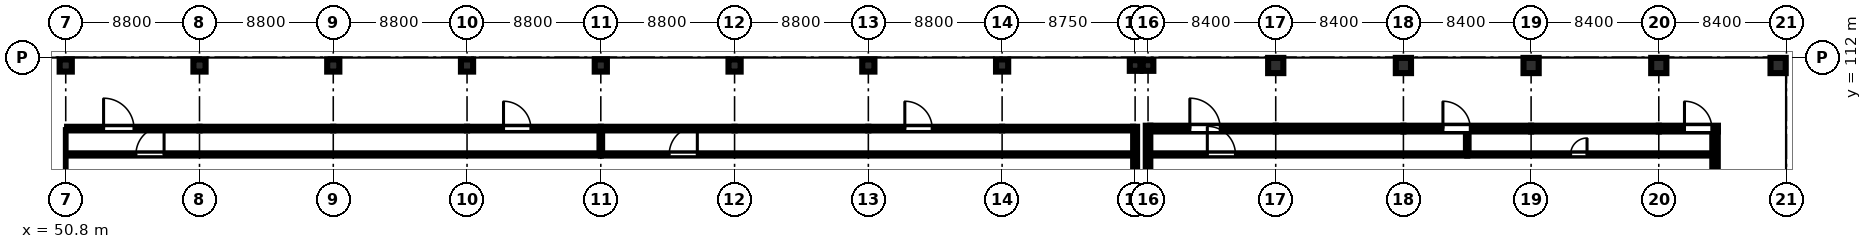
"""IFC4 building model, lengths in metres.
Left out: names, types, materials, properties, quantities, classifications, styles, units other than length and angle.
Written with IfcOpenShell. Run it as: python <this file> out.ifc"""

import sys

from ifc_helpers import new_model, si_unit, direction, frame, frame_2d, origin, origin_2d, place, context, subcontext, project, spatial, rectangle, circle, extrude, element, fill, save


model = new_model("IFC4")
c1 = context("Model", 3, precision=1e-05, world=origin(), true_north=direction((0.0, 1.0)))
c2 = subcontext(c1, "Body", "Model", "MODEL_VIEW")
j1 = project(units=[si_unit("LENGTHUNIT", "METRE"), si_unit("PLANEANGLEUNIT", "RADIAN")], contexts=[c1])
p1 = place(None, origin())
s1 = spatial("IfcSite", under=j1, at=p1, CompositionType="ELEMENT")
p2 = place(p1, origin())
s2 = spatial("IfcBuilding", under=s1, at=p2, CompositionType="ELEMENT")
p3 = place(p2, origin())
s3 = spatial("IfcBuildingStorey", under=s2, at=p3, CompositionType="ELEMENT", Elevation=0.0)
for number, where, z_axis, x_axis in (
    (1, (50.8, 111.45, 0.0), (0.0, 0.0, 1.0), (1.0, 0.0, 0.0)),
    (2, (59.6, 111.45, 0.0), (0.0, 0.0, 1.0), (1.0, 0.0, 0.0)),
    (3, (68.4, 111.45, 0.0), (0.0, 0.0, 1.0), (1.0, 0.0, 0.0)),
    (4, (77.2, 111.45, 0.0), (0.0, 0.0, 1.0), (1.0, 0.0, 0.0)),
    (5, (86.0, 111.45, 0.0), (0.0, 0.0, 1.0), (1.0, 0.0, 0.0)),
    (6, (94.8, 111.45, 0.0), (0.0, 0.0, 1.0), (1.0, 0.0, 0.0)),
    (7, (103.6, 111.45, 0.0), (0.0, 0.0, 1.0), (1.0, 0.0, 0.0)),
    (8, (112.4, 111.45, 0.0), (0.0, 0.0, 1.0), (1.0, 0.0, 0.0)),
):
    element("IfcColumn", number, at=place(p3, frame(where, z_axis=z_axis, x_axis=x_axis)), inside=s3, PredefinedType="COLUMN", context=c2, shape_type="SweptSolid", body=[
        extrude(circle(Radius=0.4, at=origin_2d()), origin(), (0.0, 0.0, 1.0), 5.18),
    ])
for number, where, z_axis, x_axis in (
    (9, (121.15, 111.45, 0.0), (0.0, 0.0, 1.0), (1.0, 0.0, 0.0)),
    (10, (122.0, 111.45, 0.0), (0.0, 0.0, 1.0), (1.0, 0.0, 0.0)),
):
    element("IfcColumn", number, at=place(p3, frame(where, z_axis=z_axis, x_axis=x_axis)), inside=s3, PredefinedType="COLUMN", context=c2, shape_type="SweptSolid", body=[
        extrude(rectangle(XDim=0.7, YDim=0.7, at=origin_2d()), origin(), (0.0, 0.0, 1.0), 5.18),
    ])
for number, where, z_axis, x_axis in (
    (11, (130.4, 111.45, 0.0), (0.0, 0.0, 1.0), (1.0, 0.0, 0.0)),
    (12, (138.8, 111.45, 0.0), (0.0, 0.0, 1.0), (1.0, 0.0, 0.0)),
    (13, (147.2, 111.45, 0.0), (0.0, 0.0, 1.0), (1.0, 0.0, 0.0)),
    (14, (155.6, 111.45, 0.0), (0.0, 0.0, 1.0), (1.0, 0.0, 0.0)),
    (15, (163.45, 111.45, 0.0), (0.0, 0.0, 1.0), (1.0, 0.0, 0.0)),
):
    element("IfcColumn", number, at=place(p3, frame(where, z_axis=z_axis, x_axis=x_axis)), inside=s3, PredefinedType="COLUMN", context=c2, shape_type="SweptSolid", body=[
        extrude(rectangle(XDim=1.0, YDim=1.0, at=origin_2d()), origin(), (0.0, 0.0, 1.0), 5.18),
    ])
p4 = place(p3, frame((50.89, 107.3, 0.0), z_axis=(0.0, 0.0, 1.0), x_axis=(1.0, 0.0, 0.0)))
e16 = element("IfcWall", 16, at=p4, inside=s3, PredefinedType="STANDARD", context=c2, shape_type="SweptSolid", body=[
    extrude(rectangle(XDim=8.71, YDim=0.24, at=frame_2d((4.355, 0.0))), origin(), (0.0, 0.0, 1.0), 5.18),
])
p5 = place(p4, frame((2.4, 0.0, 0.0)))
e17 = element("IfcOpeningElement", 17, at=p5, cuts=e16, PredefinedType="OPENING", context=c2, shape_type="SweptSolid", body=[
    extrude(rectangle(XDim=2.0, YDim=2.4, at=frame_2d((1.0, 1.2))), frame((0.0, 0.13, 0.0), z_axis=(0.0, -1.0, 0.0), x_axis=(1.0, 0.0, 0.0)), (0.0, 0.0, 1.0), 0.26),
])
p6 = place(p3, frame((59.6, 107.3, 0.0), z_axis=(0.0, 0.0, 1.0), x_axis=(1.0, 0.0, 0.0)))
e18 = element("IfcWall", 18, at=p6, inside=s3, PredefinedType="STANDARD", context=c2, shape_type="SweptSolid", body=[
    extrude(rectangle(XDim=8.8, YDim=0.24, at=frame_2d((4.4, 0.0))), origin(), (0.0, 0.0, 1.0), 5.18),
])
p7 = place(p6, frame((2.4, 0.0, 0.8)))
e19 = element("IfcOpeningElement", 19, at=p7, cuts=e18, PredefinedType="OPENING", context=c2, shape_type="SweptSolid", body=[
    extrude(rectangle(XDim=3.0, YDim=2.4, at=frame_2d((1.5, 1.2))), frame((0.0, 0.13, 0.0), z_axis=(0.0, -1.0, 0.0), x_axis=(1.0, 0.0, 0.0)), (0.0, 0.0, 1.0), 0.26),
])
p8 = place(p3, frame((68.4, 107.3, 0.0), z_axis=(0.0, 0.0, 1.0), x_axis=(1.0, 0.0, 0.0)))
e20 = element("IfcWall", 20, at=p8, inside=s3, PredefinedType="STANDARD", context=c2, shape_type="SweptSolid", body=[
    extrude(rectangle(XDim=8.8, YDim=0.24, at=frame_2d((4.4, 0.0))), origin(), (0.0, 0.0, 1.0), 5.18),
])
p9 = place(p8, frame((2.4, 0.0, 0.8)))
e21 = element("IfcOpeningElement", 21, at=p9, cuts=e20, PredefinedType="OPENING", context=c2, shape_type="SweptSolid", body=[
    extrude(rectangle(XDim=3.0, YDim=2.4, at=frame_2d((1.5, 1.2))), frame((0.0, 0.13, 0.0), z_axis=(0.0, -1.0, 0.0), x_axis=(1.0, 0.0, 0.0)), (0.0, 0.0, 1.0), 0.26),
])
p10 = place(p3, frame((77.2, 107.3, 0.0), z_axis=(0.0, 0.0, 1.0), x_axis=(1.0, 0.0, 0.0)))
e22 = element("IfcWall", 22, at=p10, inside=s3, PredefinedType="STANDARD", context=c2, shape_type="SweptSolid", body=[
    extrude(rectangle(XDim=8.8, YDim=0.24, at=frame_2d((4.4, 0.0))), origin(), (0.0, 0.0, 1.0), 5.18),
])
p11 = place(p10, frame((2.4, 0.0, 0.0)))
e23 = element("IfcOpeningElement", 23, at=p11, cuts=e22, PredefinedType="OPENING", context=c2, shape_type="SweptSolid", body=[
    extrude(rectangle(XDim=1.8, YDim=2.3, at=frame_2d((0.9, 1.15))), frame((0.0, 0.13, 0.0), z_axis=(0.0, -1.0, 0.0), x_axis=(1.0, 0.0, 0.0)), (0.0, 0.0, 1.0), 0.26),
])
p12 = place(p3, frame((86.0, 107.3, 0.0), z_axis=(0.0, 0.0, 1.0), x_axis=(1.0, 0.0, 0.0)))
e24 = element("IfcWall", 24, at=p12, inside=s3, PredefinedType="STANDARD", context=c2, shape_type="SweptSolid", body=[
    extrude(rectangle(XDim=8.8, YDim=0.24, at=frame_2d((4.4, 0.0))), origin(), (0.0, 0.0, 1.0), 5.18),
])
p13 = place(p12, frame((2.4, 0.0, 0.8)))
e25 = element("IfcOpeningElement", 25, at=p13, cuts=e24, PredefinedType="OPENING", context=c2, shape_type="SweptSolid", body=[
    extrude(rectangle(XDim=3.0, YDim=2.4, at=frame_2d((1.5, 1.2))), frame((0.0, 0.13, 0.0), z_axis=(0.0, -1.0, 0.0), x_axis=(1.0, 0.0, 0.0)), (0.0, 0.0, 1.0), 0.26),
])
p14 = place(p3, frame((94.8, 107.3, 0.0), z_axis=(0.0, 0.0, 1.0), x_axis=(1.0, 0.0, 0.0)))
e26 = element("IfcWall", 26, at=p14, inside=s3, PredefinedType="STANDARD", context=c2, shape_type="SweptSolid", body=[
    extrude(rectangle(XDim=8.8, YDim=0.24, at=frame_2d((4.4, 0.0))), origin(), (0.0, 0.0, 1.0), 5.18),
])
p15 = place(p14, frame((2.4, 0.0, 0.8)))
e27 = element("IfcOpeningElement", 27, at=p15, cuts=e26, PredefinedType="OPENING", context=c2, shape_type="SweptSolid", body=[
    extrude(rectangle(XDim=3.0, YDim=2.4, at=frame_2d((1.5, 1.2))), frame((0.0, 0.13, 0.0), z_axis=(0.0, -1.0, 0.0), x_axis=(1.0, 0.0, 0.0)), (0.0, 0.0, 1.0), 0.26),
])
p16 = place(p3, frame((103.6, 107.3, 0.0), z_axis=(0.0, 0.0, 1.0), x_axis=(1.0, 0.0, 0.0)))
e28 = element("IfcWall", 28, at=p16, inside=s3, PredefinedType="STANDARD", context=c2, shape_type="SweptSolid", body=[
    extrude(rectangle(XDim=8.8, YDim=0.24, at=frame_2d((4.4, 0.0))), origin(), (0.0, 0.0, 1.0), 5.18),
])
p17 = place(p16, frame((2.4, 0.0, 0.0)))
e29 = element("IfcOpeningElement", 29, at=p17, cuts=e28, PredefinedType="OPENING", context=c2, shape_type="SweptSolid", body=[
    extrude(rectangle(XDim=1.8, YDim=2.3, at=frame_2d((0.9, 1.15))), frame((0.0, 0.13, 0.0), z_axis=(0.0, -1.0, 0.0), x_axis=(1.0, 0.0, 0.0)), (0.0, 0.0, 1.0), 0.26),
])
p18 = place(p3, frame((112.4, 107.3, 0.0), z_axis=(0.0, 0.0, 1.0), x_axis=(1.0, 0.0, 0.0)))
e30 = element("IfcWall", 30, at=p18, inside=s3, PredefinedType="STANDARD", context=c2, shape_type="SweptSolid", body=[
    extrude(rectangle(XDim=8.62, YDim=0.24, at=frame_2d((4.31, 0.0))), origin(), (0.0, 0.0, 1.0), 5.18),
])
p19 = place(p18, frame((2.4, 0.0, 0.8)))
e31 = element("IfcOpeningElement", 31, at=p19, cuts=e30, PredefinedType="OPENING", context=c2, shape_type="SweptSolid", body=[
    extrude(rectangle(XDim=3.0, YDim=2.4, at=frame_2d((1.5, 1.2))), frame((0.0, 0.13, 0.0), z_axis=(0.0, -1.0, 0.0), x_axis=(1.0, 0.0, 0.0)), (0.0, 0.0, 1.0), 0.26),
])
p20 = place(p3, frame((121.15, 107.42, 0.0), z_axis=(0.0, 0.0, 1.0), x_axis=(0.0, -1.0, 0.0)))
e32 = element("IfcWall", 32, at=p20, inside=s3, PredefinedType="STANDARD", context=c2, shape_type="SweptSolid", body=[
    extrude(rectangle(XDim=3.47, YDim=0.26, at=frame_2d((1.735, 0.0))), origin(), (0.0, 0.0, 1.0), 4.53),
])
p21 = place(p3, frame((122.15, 107.3, 0.0), z_axis=(0.0, 0.0, 1.0), x_axis=(1.0, 0.0, 0.0)))
e33 = element("IfcWall", 33, at=p21, inside=s3, PredefinedType="SOLIDWALL", context=c2, shape_type="SweptSolid", body=[
    extrude(rectangle(XDim=8.25, YDim=0.38, at=frame_2d((4.125, 0.0))), origin(), (0.0, 0.0, 1.0), 5.18),
])
p22 = place(p21, frame((2.6, 0.0, 0.0)))
e34 = element("IfcOpeningElement", 34, at=p22, cuts=e33, PredefinedType="OPENING", context=c2, shape_type="SweptSolid", body=[
    extrude(rectangle(XDim=2.0, YDim=2.4, at=frame_2d((1.0, 1.2))), frame((0.0, 0.2, 0.0), z_axis=(0.0, -1.0, 0.0), x_axis=(1.0, 0.0, 0.0)), (0.0, 0.0, 1.0), 0.4),
])
p23 = place(p3, frame((130.4, 107.3, 0.0), z_axis=(0.0, 0.0, 1.0), x_axis=(1.0, 0.0, 0.0)))
e35 = element("IfcWall", 35, at=p23, inside=s3, PredefinedType="SOLIDWALL", context=c2, shape_type="SweptSolid", body=[
    extrude(rectangle(XDim=8.4, YDim=0.38, at=frame_2d((4.2, 0.0))), origin(), (0.0, 0.0, 1.0), 5.18),
])
p24 = place(p23, frame((2.4, 0.0, 0.85)))
e36 = element("IfcOpeningElement", 36, at=p24, cuts=e35, PredefinedType="OPENING", context=c2, shape_type="SweptSolid", body=[
    extrude(rectangle(XDim=2.6, YDim=2.4, at=frame_2d((1.3, 1.2))), frame((0.0, 0.2, 0.0), z_axis=(0.0, -1.0, 0.0), x_axis=(1.0, 0.0, 0.0)), (0.0, 0.0, 1.0), 0.4),
])
p25 = place(p3, frame((138.8, 107.3, 0.0), z_axis=(0.0, 0.0, 1.0), x_axis=(1.0, 0.0, 0.0)))
e37 = element("IfcWall", 37, at=p25, inside=s3, PredefinedType="SOLIDWALL", context=c2, shape_type="SweptSolid", body=[
    extrude(rectangle(XDim=8.4, YDim=0.38, at=frame_2d((4.2, 0.0))), origin(), (0.0, 0.0, 1.0), 5.18),
])
p26 = place(p25, frame((2.6, 0.0, 0.0)))
e38 = element("IfcOpeningElement", 38, at=p26, cuts=e37, PredefinedType="OPENING", context=c2, shape_type="SweptSolid", body=[
    extrude(rectangle(XDim=1.8, YDim=2.3, at=frame_2d((0.9, 1.15))), frame((0.0, 0.2, 0.0), z_axis=(0.0, -1.0, 0.0), x_axis=(1.0, 0.0, 0.0)), (0.0, 0.0, 1.0), 0.4),
])
p27 = place(p3, frame((147.2, 107.3, 0.0), z_axis=(0.0, 0.0, 1.0), x_axis=(1.0, 0.0, 0.0)))
e39 = element("IfcWall", 39, at=p27, inside=s3, PredefinedType="SOLIDWALL", context=c2, shape_type="SweptSolid", body=[
    extrude(rectangle(XDim=8.4, YDim=0.38, at=frame_2d((4.2, 0.0))), origin(), (0.0, 0.0, 1.0), 5.18),
])
p28 = place(p27, frame((2.4, 0.0, 0.85)))
e40 = element("IfcOpeningElement", 40, at=p28, cuts=e39, PredefinedType="OPENING", context=c2, shape_type="SweptSolid", body=[
    extrude(rectangle(XDim=2.6, YDim=2.4, at=frame_2d((1.3, 1.2))), frame((0.0, 0.2, 0.0), z_axis=(0.0, -1.0, 0.0), x_axis=(1.0, 0.0, 0.0)), (0.0, 0.0, 1.0), 0.4),
])
p29 = place(p3, frame((155.6, 107.3, 0.0), z_axis=(0.0, 0.0, 1.0), x_axis=(1.0, 0.0, 0.0)))
e41 = element("IfcWall", 41, at=p29, inside=s3, PredefinedType="SOLIDWALL", context=c2, shape_type="SweptSolid", body=[
    extrude(rectangle(XDim=3.89, YDim=0.38, at=frame_2d((1.945, 0.0))), origin(), (0.0, 0.0, 1.0), 5.18),
])
p30 = place(p29, frame((1.69, 0.0, 0.0)))
e42 = element("IfcOpeningElement", 42, at=p30, cuts=e41, PredefinedType="OPENING", context=c2, shape_type="SweptSolid", body=[
    extrude(rectangle(XDim=1.8, YDim=2.3, at=frame_2d((0.9, 1.15))), frame((0.0, 0.2, 0.0), z_axis=(0.0, -1.0, 0.0), x_axis=(1.0, 0.0, 0.0)), (0.0, 0.0, 1.0), 0.4),
])
p31 = place(p3, frame((159.3, 107.11, 0.0), z_axis=(0.0, 0.0, 1.0), x_axis=(0.0, -1.0, 0.0)))
e43 = element("IfcWall", 43, at=p31, inside=s3, PredefinedType="STANDARD", context=c2, shape_type="SweptSolid", body=[
    extrude(rectangle(XDim=3.51, YDim=0.36, at=frame_2d((1.755, 0.0))), origin(), (0.0, 0.0, 1.0), 4.78),
])
p32 = place(p31, frame((1.95, 0.0, 1.1)))
e44 = element("IfcOpeningElement", 44, at=p32, cuts=e43, PredefinedType="OPENING", context=c2, shape_type="SweptSolid", body=[
    extrude(rectangle(XDim=1.2, YDim=1.8, at=frame_2d((0.6, 0.9))), frame((0.0, 0.19, 0.0), z_axis=(0.0, -1.0, 0.0), x_axis=(1.0, 0.0, 0.0)), (0.0, 0.0, 1.0), 0.38),
])
p33 = place(p3, frame((122.0, 103.95, 0.0), z_axis=(0.0, 0.0, 1.0), x_axis=(0.0, 1.0, 0.0)))
e45 = element("IfcWall", 45, at=p33, inside=s3, PredefinedType="STANDARD", context=c2, shape_type="SweptSolid", body=[
    extrude(rectangle(XDim=3.54, YDim=0.3, at=frame_2d((1.77, 0.0))), origin(), (0.0, 0.0, 1.0), 4.43),
])
p34 = place(p3, frame((50.92, 105.6, 0.0), z_axis=(0.0, 0.0, 1.0), x_axis=(1.0, 0.0, 0.0)))
e46 = element("IfcWall", 46, at=p34, inside=s3, PredefinedType="PARTITIONING", context=c2, shape_type="SweptSolid", body=[
    extrude(rectangle(XDim=35.08, YDim=0.145, at=frame_2d((17.54, 0.0))), origin(), (0.0, 0.0, 1.0), 5.18),
])
p35 = place(p34, frame((4.5, 0.0, 0.0)))
e47 = element("IfcOpeningElement", 47, at=p35, cuts=e46, PredefinedType="OPENING", context=c2, shape_type="SweptSolid", body=[
    extrude(rectangle(XDim=1.85, YDim=2.25, at=frame_2d((0.925, 1.125))), frame((0.0, 0.083, 0.0), z_axis=(0.0, -1.0, 0.0), x_axis=(1.0, 0.0, 0.0)), (0.0, 0.0, 1.0), 0.165),
])
p36 = place(p3, frame((86.0, 105.6, 0.0), z_axis=(0.0, 0.0, 1.0), x_axis=(1.0, 0.0, 0.0)))
e48 = element("IfcWall", 48, at=p36, inside=s3, PredefinedType="PARTITIONING", context=c2, shape_type="SweptSolid", body=[
    extrude(rectangle(XDim=35.02, YDim=0.145, at=frame_2d((17.51, 0.0))), origin(), (0.0, 0.0, 1.0), 5.18),
])
p37 = place(p36, frame((4.5, 0.0, 0.0)))
e49 = element("IfcOpeningElement", 49, at=p37, cuts=e48, PredefinedType="OPENING", context=c2, shape_type="SweptSolid", body=[
    extrude(rectangle(XDim=1.85, YDim=2.25, at=frame_2d((0.925, 1.125))), frame((0.0, 0.083, 0.0), z_axis=(0.0, -1.0, 0.0), x_axis=(1.0, 0.0, 0.0)), (0.0, 0.0, 1.0), 0.165),
])
p38 = place(p3, frame((86.0, 105.6, 0.0), z_axis=(0.0, 0.0, 1.0), x_axis=(0.0, 1.0, 0.0)))
e50 = element("IfcWall", 50, at=p38, inside=s3, PredefinedType="PARTITIONING", context=c2, shape_type="SweptSolid", body=[
    extrude(rectangle(XDim=1.58, YDim=0.172, at=frame_2d((0.79, 0.0))), origin(), (0.0, 0.0, 1.0), 4.53),
])
p39 = place(p3, frame((122.15, 105.6, 0.0), z_axis=(0.0, 0.0, 1.0), x_axis=(1.0, 0.0, 0.0)))
e51 = element("IfcWall", 51, at=p39, inside=s3, PredefinedType="PARTITIONING", context=c2, shape_type="SweptSolid", body=[
    extrude(rectangle(XDim=20.85, YDim=0.145, at=frame_2d((10.425, 0.0))), origin(), (0.0, 0.0, 1.0), 5.18),
])
p40 = place(p39, frame((3.75, 0.0, 0.0)))
e52 = element("IfcOpeningElement", 52, at=p40, cuts=e51, PredefinedType="OPENING", context=c2, shape_type="SweptSolid", body=[
    extrude(rectangle(XDim=1.85, YDim=2.25, at=frame_2d((0.925, 1.125))), frame((0.0, 0.083, 0.0), z_axis=(0.0, -1.0, 0.0), x_axis=(1.0, 0.0, 0.0)), (0.0, 0.0, 1.0), 0.165),
])
p41 = place(p3, frame((143.0, 105.6, 0.0), z_axis=(0.0, 0.0, 1.0), x_axis=(1.0, 0.0, 0.0)))
e53 = element("IfcWall", 53, at=p41, inside=s3, PredefinedType="PARTITIONING", context=c2, shape_type="SweptSolid", body=[
    extrude(rectangle(XDim=16.12, YDim=0.145, at=frame_2d((8.06, 0.0))), origin(), (0.0, 0.0, 1.0), 5.18),
])
p42 = place(p41, frame((6.8, 0.0, 0.0)))
e54 = element("IfcOpeningElement", 54, at=p42, cuts=e53, PredefinedType="OPENING", context=c2, shape_type="SweptSolid", body=[
    extrude(rectangle(XDim=1.08, YDim=2.15, at=frame_2d((0.54, 1.075))), frame((0.0, 0.083, 0.0), z_axis=(0.0, -1.0, 0.0), x_axis=(1.0, 0.0, 0.0)), (0.0, 0.0, 1.0), 0.165),
])
p43 = place(p3, frame((143.0, 105.6, 0.0), z_axis=(0.0, 0.0, 1.0), x_axis=(0.0, 1.0, 0.0)))
e55 = element("IfcWall", 55, at=p43, inside=s3, PredefinedType="PARTITIONING", context=c2, shape_type="SweptSolid", body=[
    extrude(rectangle(XDim=1.52, YDim=0.172, at=frame_2d((0.76, 0.0))), origin(), (0.0, 0.0, 1.0), 4.78),
])
p44 = place(p5, origin())
e56 = element("IfcDoor", 56, at=p44, inside=s3, OperationType="SINGLE_SWING_LEFT", PredefinedType="DOOR", context=c2, shape_type="SweptSolid", body=[
    extrude(rectangle(XDim=2.0, YDim=2.4, at=frame_2d((1.0, 1.2))), frame((0.0, 0.025, 0.0), z_axis=(0.0, -1.0, 0.0), x_axis=(1.0, 0.0, 0.0)), (0.0, 0.0, 1.0), 0.05),
])
fill(e17, e56)
p45 = place(p7, origin())
e57 = element("IfcWindow", 57, at=p45, inside=s3, PartitioningType="TRIPLE_PANEL_VERTICAL", PredefinedType="WINDOW", context=c2, shape_type="SweptSolid", body=[
    extrude(rectangle(XDim=3.0, YDim=2.4, at=frame_2d((1.5, 1.2))), frame((0.0, 0.03, 0.0), z_axis=(0.0, -1.0, 0.0), x_axis=(1.0, 0.0, 0.0)), (0.0, 0.0, 1.0), 0.06),
])
fill(e19, e57)
p46 = place(p9, origin())
e58 = element("IfcWindow", 58, at=p46, inside=s3, PartitioningType="TRIPLE_PANEL_VERTICAL", PredefinedType="WINDOW", context=c2, shape_type="SweptSolid", body=[
    extrude(rectangle(XDim=3.0, YDim=2.4, at=frame_2d((1.5, 1.2))), frame((0.0, 0.03, 0.0), z_axis=(0.0, -1.0, 0.0), x_axis=(1.0, 0.0, 0.0)), (0.0, 0.0, 1.0), 0.06),
])
fill(e21, e58)
p47 = place(p11, origin())
e59 = element("IfcDoor", 59, at=p47, inside=s3, OperationType="SINGLE_SWING_LEFT", PredefinedType="DOOR", context=c2, shape_type="SweptSolid", body=[
    extrude(rectangle(XDim=1.8, YDim=2.3, at=frame_2d((0.9, 1.15))), frame((0.0, 0.025, 0.0), z_axis=(0.0, -1.0, 0.0), x_axis=(1.0, 0.0, 0.0)), (0.0, 0.0, 1.0), 0.05),
])
fill(e23, e59)
p48 = place(p13, origin())
e60 = element("IfcWindow", 60, at=p48, inside=s3, PartitioningType="TRIPLE_PANEL_VERTICAL", PredefinedType="WINDOW", context=c2, shape_type="SweptSolid", body=[
    extrude(rectangle(XDim=3.0, YDim=2.4, at=frame_2d((1.5, 1.2))), frame((0.0, 0.03, 0.0), z_axis=(0.0, -1.0, 0.0), x_axis=(1.0, 0.0, 0.0)), (0.0, 0.0, 1.0), 0.06),
])
fill(e25, e60)
p49 = place(p15, origin())
e61 = element("IfcWindow", 61, at=p49, inside=s3, PartitioningType="TRIPLE_PANEL_VERTICAL", PredefinedType="WINDOW", context=c2, shape_type="SweptSolid", body=[
    extrude(rectangle(XDim=3.0, YDim=2.4, at=frame_2d((1.5, 1.2))), frame((0.0, 0.03, 0.0), z_axis=(0.0, -1.0, 0.0), x_axis=(1.0, 0.0, 0.0)), (0.0, 0.0, 1.0), 0.06),
])
fill(e27, e61)
p50 = place(p17, origin())
e62 = element("IfcDoor", 62, at=p50, inside=s3, OperationType="SINGLE_SWING_LEFT", PredefinedType="DOOR", context=c2, shape_type="SweptSolid", body=[
    extrude(rectangle(XDim=1.8, YDim=2.3, at=frame_2d((0.9, 1.15))), frame((0.0, 0.025, 0.0), z_axis=(0.0, -1.0, 0.0), x_axis=(1.0, 0.0, 0.0)), (0.0, 0.0, 1.0), 0.05),
])
fill(e29, e62)
p51 = place(p19, origin())
e63 = element("IfcWindow", 63, at=p51, inside=s3, PartitioningType="TRIPLE_PANEL_VERTICAL", PredefinedType="WINDOW", context=c2, shape_type="SweptSolid", body=[
    extrude(rectangle(XDim=3.0, YDim=2.4, at=frame_2d((1.5, 1.2))), frame((0.0, 0.03, 0.0), z_axis=(0.0, -1.0, 0.0), x_axis=(1.0, 0.0, 0.0)), (0.0, 0.0, 1.0), 0.06),
])
fill(e31, e63)
p52 = place(p22, origin())
e64 = element("IfcDoor", 64, at=p52, inside=s3, OperationType="SINGLE_SWING_LEFT", PredefinedType="DOOR", context=c2, shape_type="SweptSolid", body=[
    extrude(rectangle(XDim=2.0, YDim=2.4, at=frame_2d((1.0, 1.2))), frame((0.0, 0.025, 0.0), z_axis=(0.0, -1.0, 0.0), x_axis=(1.0, 0.0, 0.0)), (0.0, 0.0, 1.0), 0.05),
])
fill(e34, e64)
p53 = place(p24, origin())
e65 = element("IfcWindow", 65, at=p53, inside=s3, PartitioningType="TRIPLE_PANEL_VERTICAL", PredefinedType="WINDOW", context=c2, shape_type="SweptSolid", body=[
    extrude(rectangle(XDim=2.6, YDim=2.4, at=frame_2d((1.3, 1.2))), frame((0.0, 0.03, 0.0), z_axis=(0.0, -1.0, 0.0), x_axis=(1.0, 0.0, 0.0)), (0.0, 0.0, 1.0), 0.06),
])
fill(e36, e65)
p54 = place(p26, origin())
e66 = element("IfcDoor", 66, at=p54, inside=s3, OperationType="SINGLE_SWING_LEFT", PredefinedType="DOOR", context=c2, shape_type="SweptSolid", body=[
    extrude(rectangle(XDim=1.8, YDim=2.3, at=frame_2d((0.9, 1.15))), frame((0.0, 0.025, 0.0), z_axis=(0.0, -1.0, 0.0), x_axis=(1.0, 0.0, 0.0)), (0.0, 0.0, 1.0), 0.05),
])
fill(e38, e66)
p55 = place(p28, origin())
e67 = element("IfcWindow", 67, at=p55, inside=s3, PartitioningType="TRIPLE_PANEL_VERTICAL", PredefinedType="WINDOW", context=c2, shape_type="SweptSolid", body=[
    extrude(rectangle(XDim=2.6, YDim=2.4, at=frame_2d((1.3, 1.2))), frame((0.0, 0.03, 0.0), z_axis=(0.0, -1.0, 0.0), x_axis=(1.0, 0.0, 0.0)), (0.0, 0.0, 1.0), 0.06),
])
fill(e40, e67)
p56 = place(p30, origin())
e68 = element("IfcDoor", 68, at=p56, inside=s3, OperationType="SINGLE_SWING_LEFT", PredefinedType="DOOR", context=c2, shape_type="SweptSolid", body=[
    extrude(rectangle(XDim=1.8, YDim=2.3, at=frame_2d((0.9, 1.15))), frame((0.0, 0.025, 0.0), z_axis=(0.0, -1.0, 0.0), x_axis=(1.0, 0.0, 0.0)), (0.0, 0.0, 1.0), 0.05),
])
fill(e42, e68)
p57 = place(p32, origin())
e69 = element("IfcWindow", 69, at=p57, inside=s3, PartitioningType="SINGLE_PANEL", PredefinedType="WINDOW", context=c2, shape_type="SweptSolid", body=[
    extrude(rectangle(XDim=1.2, YDim=1.8, at=frame_2d((0.6, 0.9))), frame((0.0, 0.03, 0.0), z_axis=(0.0, -1.0, 0.0), x_axis=(1.0, 0.0, 0.0)), (0.0, 0.0, 1.0), 0.06),
])
fill(e44, e69)
p58 = place(p35, origin())
e70 = element("IfcDoor", 70, at=p58, inside=s3, OperationType="SINGLE_SWING_RIGHT", PredefinedType="DOOR", context=c2, shape_type="SweptSolid", body=[
    extrude(rectangle(XDim=1.85, YDim=2.25, at=frame_2d((0.925, 1.125))), frame((0.0, 0.025, 0.0), z_axis=(0.0, -1.0, 0.0), x_axis=(1.0, 0.0, 0.0)), (0.0, 0.0, 1.0), 0.05),
])
fill(e47, e70)
p59 = place(p37, origin())
e71 = element("IfcDoor", 71, at=p59, inside=s3, OperationType="SINGLE_SWING_RIGHT", PredefinedType="DOOR", context=c2, shape_type="SweptSolid", body=[
    extrude(rectangle(XDim=1.85, YDim=2.25, at=frame_2d((0.925, 1.125))), frame((0.0, 0.025, 0.0), z_axis=(0.0, -1.0, 0.0), x_axis=(1.0, 0.0, 0.0)), (0.0, 0.0, 1.0), 0.05),
])
fill(e49, e71)
p60 = place(p40, origin())
e72 = element("IfcDoor", 72, at=p60, inside=s3, OperationType="SINGLE_SWING_LEFT", PredefinedType="DOOR", context=c2, shape_type="SweptSolid", body=[
    extrude(rectangle(XDim=1.85, YDim=2.25, at=frame_2d((0.925, 1.125))), frame((0.0, 0.025, 0.0), z_axis=(0.0, -1.0, 0.0), x_axis=(1.0, 0.0, 0.0)), (0.0, 0.0, 1.0), 0.05),
])
fill(e52, e72)
p61 = place(p42, origin())
e73 = element("IfcDoor", 73, at=p61, inside=s3, OperationType="SINGLE_SWING_RIGHT", PredefinedType="DOOR", context=c2, shape_type="SweptSolid", body=[
    extrude(rectangle(XDim=1.08, YDim=2.15, at=frame_2d((0.54, 1.075))), frame((0.0, 0.025, 0.0), z_axis=(0.0, -1.0, 0.0), x_axis=(1.0, 0.0, 0.0)), (0.0, 0.0, 1.0), 0.05),
])
fill(e54, e73)
save(model, sys.argv[1])
